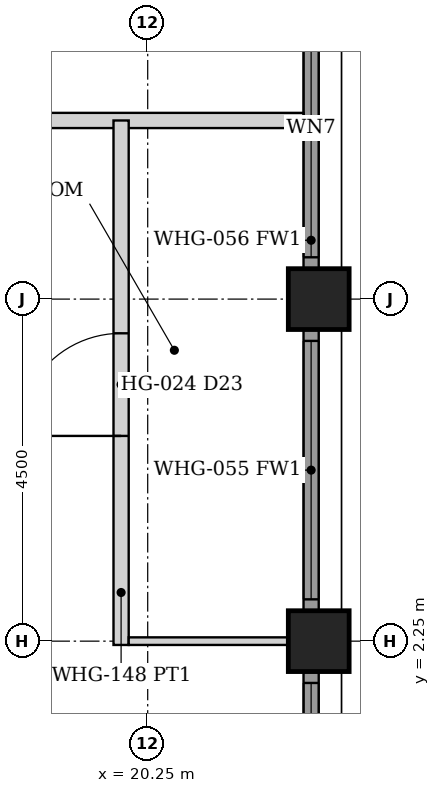
"""IFC4 building model, lengths in metres.
Left out: names, types, materials, properties, quantities, classifications, styles, units other than length and angle.
Written with IfcOpenShell. Run it as: python <this file> out.ifc"""

import sys

from ifc_helpers import new_model, si_unit, direction, frame, frame_2d, origin, origin_2d, place, context, subcontext, project, spatial, rectangle, hollow_rectangle, extrude, element, fill, save


model = new_model("IFC4")
c1 = context("Model", 3, precision=1e-05, world=origin(), true_north=direction((0.0, 1.0)))
c2 = subcontext(c1, "Body", "Model", "MODEL_VIEW")
j1 = project(units=[si_unit("LENGTHUNIT", "METRE"), si_unit("PLANEANGLEUNIT", "RADIAN")], contexts=[c1])
p1 = place(None, origin())
s1 = spatial("IfcSite", under=j1, at=p1, CompositionType="ELEMENT")
p2 = place(p1, origin())
s2 = spatial("IfcBuilding", under=s1, at=p2, CompositionType="ELEMENT")
p3 = place(p2, frame((0.0, 0.0, 186.8)))
s3 = spatial("IfcBuildingStorey", under=s2, at=p3, CompositionType="ELEMENT", Elevation=186.8)
for number, where, z_axis, x_axis in (
    (1, (22.5, 2.25, 0.0), (0.0, 0.0, 1.0), (1.0, 0.0, 0.0)),
    (2, (22.5, 6.75, 0.0), (0.0, 0.0, 1.0), (1.0, 0.0, 0.0)),
):
    element("IfcColumn", number, at=place(p3, frame(where, z_axis=z_axis, x_axis=x_axis)), inside=s3, PredefinedType="COLUMN", context=c2, shape_type="SweptSolid", body=[
        extrude(hollow_rectangle(XDim=0.8, YDim=0.8, WallThickness=0.045, at=origin_2d()), origin(), (0.0, 0.0, 1.0), 3.6),
    ])
p4 = place(p3, frame((22.4, -1.845, 0.0), z_axis=(0.0, 0.0, 1.0), x_axis=(0.0, 1.0, 0.0)))
e3 = element("IfcWall", 3, at=p4, inside=s3, PredefinedType="SOLIDWALL", context=c2, shape_type="SweptSolid", body=[
    extrude(rectangle(XDim=3.69, YDim=0.2, at=frame_2d((1.845, 0.0))), origin(), (0.0, 0.0, 1.0), 2.379),
])
p5 = place(p4, frame((0.145, 0.0, 0.3)))
e4 = element("IfcOpeningElement", 4, at=p5, cuts=e3, PredefinedType="OPENING", context=c2, shape_type="SweptSolid", body=[
    extrude(rectangle(XDim=3.4, YDim=1.929, at=frame_2d((1.7, 0.964))), frame((0.0, 0.11, 0.0), z_axis=(0.0, -1.0, 0.0), x_axis=(1.0, 0.0, 0.0)), (0.0, 0.0, 1.0), 0.22),
])
p6 = place(p3, frame((22.4, 2.655, 0.0), z_axis=(0.0, 0.0, 1.0), x_axis=(0.0, 1.0, 0.0)))
e5 = element("IfcWall", 5, at=p6, inside=s3, PredefinedType="SOLIDWALL", context=c2, shape_type="SweptSolid", body=[
    extrude(rectangle(XDim=3.69, YDim=0.2, at=frame_2d((1.845, 0.0))), origin(), (0.0, 0.0, 1.0), 2.379),
])
p7 = place(p6, frame((0.145, 0.0, 0.3)))
e6 = element("IfcOpeningElement", 6, at=p7, cuts=e5, PredefinedType="OPENING", context=c2, shape_type="SweptSolid", body=[
    extrude(rectangle(XDim=3.4, YDim=1.929, at=frame_2d((1.7, 0.964))), frame((0.0, 0.11, 0.0), z_axis=(0.0, -1.0, 0.0), x_axis=(1.0, 0.0, 0.0)), (0.0, 0.0, 1.0), 0.22),
])
p8 = place(p3, frame((22.4, 7.155, 0.0), z_axis=(0.0, 0.0, 1.0), x_axis=(0.0, 1.0, 0.0)))
e7 = element("IfcWall", 7, at=p8, inside=s3, PredefinedType="SOLIDWALL", context=c2, shape_type="SweptSolid", body=[
    extrude(rectangle(XDim=3.69, YDim=0.2, at=frame_2d((1.845, 0.0))), origin(), (0.0, 0.0, 1.0), 2.379),
])
p9 = place(p8, frame((0.145, 0.0, 0.3)))
e8 = element("IfcOpeningElement", 8, at=p9, cuts=e7, PredefinedType="OPENING", context=c2, shape_type="SweptSolid", body=[
    extrude(rectangle(XDim=3.4, YDim=1.929, at=frame_2d((1.7, 0.964))), frame((0.0, 0.11, 0.0), z_axis=(0.0, -1.0, 0.0), x_axis=(1.0, 0.0, 0.0)), (0.0, 0.0, 1.0), 0.22),
])
p10 = place(p3, frame((-22.3, 9.1, 0.0), z_axis=(0.0, 0.0, 1.0), x_axis=(1.0, 0.0, 0.0)))
e9 = element("IfcWall", 9, at=p10, inside=s3, PredefinedType="PARTITIONING", context=c2, shape_type="SweptSolid", body=[
    extrude(rectangle(XDim=44.6, YDim=0.2, at=frame_2d((22.3, 0.0))), origin(), (0.0, 0.0, 1.0), 2.379),
])
p11 = place(p10, frame((11.35, 0.0, 0.0)))
e10 = element("IfcOpeningElement", 10, at=p11, cuts=e9, PredefinedType="OPENING", context=c2, shape_type="SweptSolid", body=[
    extrude(rectangle(XDim=0.9, YDim=2.1, at=frame_2d((0.45, 1.05))), frame((0.0, 0.11, 0.0), z_axis=(0.0, -1.0, 0.0), x_axis=(1.0, 0.0, 0.0)), (0.0, 0.0, 1.0), 0.22),
])
p12 = place(p10, frame((15.75, 0.0, 0.0)))
e11 = element("IfcOpeningElement", 11, at=p12, cuts=e9, PredefinedType="OPENING", context=c2, shape_type="SweptSolid", body=[
    extrude(rectangle(XDim=0.9, YDim=2.1, at=frame_2d((0.45, 1.05))), frame((0.0, 0.11, 0.0), z_axis=(0.0, -1.0, 0.0), x_axis=(1.0, 0.0, 0.0)), (0.0, 0.0, 1.0), 0.22),
])
p13 = place(p10, frame((23.45, 0.0, 0.0)))
e12 = element("IfcOpeningElement", 12, at=p13, cuts=e9, PredefinedType="OPENING", context=c2, shape_type="SweptSolid", body=[
    extrude(rectangle(XDim=0.9, YDim=2.1, at=frame_2d((0.45, 1.05))), frame((0.0, 0.11, 0.0), z_axis=(0.0, -1.0, 0.0), x_axis=(1.0, 0.0, 0.0)), (0.0, 0.0, 1.0), 0.22),
])
p14 = place(p10, frame((24.75, 0.0, 0.0)))
e13 = element("IfcOpeningElement", 13, at=p14, cuts=e9, PredefinedType="OPENING", context=c2, shape_type="SweptSolid", body=[
    extrude(rectangle(XDim=0.9, YDim=2.1, at=frame_2d((0.45, 1.05))), frame((0.0, 0.11, 0.0), z_axis=(0.0, -1.0, 0.0), x_axis=(1.0, 0.0, 0.0)), (0.0, 0.0, 1.0), 0.22),
])
p15 = place(p10, frame((29.35, 0.0, 0.0)))
e14 = element("IfcOpeningElement", 14, at=p15, cuts=e9, PredefinedType="OPENING", context=c2, shape_type="SweptSolid", body=[
    extrude(rectangle(XDim=0.9, YDim=2.1, at=frame_2d((0.45, 1.05))), frame((0.0, 0.11, 0.0), z_axis=(0.0, -1.0, 0.0), x_axis=(1.0, 0.0, 0.0)), (0.0, 0.0, 1.0), 0.22),
])
p16 = place(p10, frame((38.85, 0.0, 0.0)))
e15 = element("IfcOpeningElement", 15, at=p16, cuts=e9, PredefinedType="OPENING", context=c2, shape_type="SweptSolid", body=[
    extrude(rectangle(XDim=0.9, YDim=2.1, at=frame_2d((0.45, 1.05))), frame((0.0, 0.11, 0.0), z_axis=(0.0, -1.0, 0.0), x_axis=(1.0, 0.0, 0.0)), (0.0, 0.0, 1.0), 0.22),
])
p17 = place(p10, frame((4.85, 0.0, 0.0)))
e16 = element("IfcOpeningElement", 16, at=p17, cuts=e9, PredefinedType="OPENING", context=c2, shape_type="SweptSolid", body=[
    extrude(rectangle(XDim=0.9, YDim=2.1, at=frame_2d((0.45, 1.05))), frame((0.0, 0.11, 0.0), z_axis=(0.0, -1.0, 0.0), x_axis=(1.0, 0.0, 0.0)), (0.0, 0.0, 1.0), 0.22),
])
p18 = place(p3, frame((19.9, 2.2, 0.0), z_axis=(0.0, 0.0, 1.0), x_axis=(0.0, 1.0, 0.0)))
e17 = element("IfcWall", 17, at=p18, inside=s3, PredefinedType="PARTITIONING", context=c2, shape_type="SweptSolid", body=[
    extrude(rectangle(XDim=6.9, YDim=0.2, at=frame_2d((3.45, 0.0))), origin(), (0.0, 0.0, 1.0), 2.379),
])
p19 = place(p18, frame((2.75, 0.0, 0.0)))
e18 = element("IfcOpeningElement", 18, at=p19, cuts=e17, PredefinedType="OPENING", context=c2, shape_type="SweptSolid", body=[
    extrude(rectangle(XDim=1.35, YDim=2.1, at=frame_2d((0.675, 1.05))), frame((0.0, 0.11, 0.0), z_axis=(0.0, -1.0, 0.0), x_axis=(1.0, 0.0, 0.0)), (0.0, 0.0, 1.0), 0.22),
])
p20 = place(p3, frame((20.0, 2.25, 0.0), z_axis=(0.0, 0.0, 1.0), x_axis=(1.0, 0.0, 0.0)))
e19 = element("IfcWall", 19, at=p20, inside=s3, PredefinedType="PARTITIONING", context=c2, shape_type="SweptSolid", body=[
    extrude(rectangle(XDim=2.1, YDim=0.1, at=frame_2d((1.05, 0.0))), origin(), (0.0, 0.0, 1.0), 2.379),
])
p21 = place(p5, origin())
e20 = element("IfcWindow", 20, at=p21, inside=s3, PartitioningType="SINGLE_PANEL", PredefinedType="WINDOW", context=c2, shape_type="SweptSolid", body=[
    extrude(rectangle(XDim=3.4, YDim=1.929, at=frame_2d((1.7, 0.964))), frame((0.0, 0.03, 0.0), z_axis=(0.0, -1.0, 0.0), x_axis=(1.0, 0.0, 0.0)), (0.0, 0.0, 1.0), 0.06),
])
fill(e4, e20)
p22 = place(p7, origin())
e21 = element("IfcWindow", 21, at=p22, inside=s3, PartitioningType="SINGLE_PANEL", PredefinedType="WINDOW", context=c2, shape_type="SweptSolid", body=[
    extrude(rectangle(XDim=3.4, YDim=1.929, at=frame_2d((1.7, 0.964))), frame((0.0, 0.03, 0.0), z_axis=(0.0, -1.0, 0.0), x_axis=(1.0, 0.0, 0.0)), (0.0, 0.0, 1.0), 0.06),
])
fill(e6, e21)
p23 = place(p9, origin())
e22 = element("IfcWindow", 22, at=p23, inside=s3, PartitioningType="SINGLE_PANEL", PredefinedType="WINDOW", context=c2, shape_type="SweptSolid", body=[
    extrude(rectangle(XDim=3.4, YDim=1.929, at=frame_2d((1.7, 0.964))), frame((0.0, 0.03, 0.0), z_axis=(0.0, -1.0, 0.0), x_axis=(1.0, 0.0, 0.0)), (0.0, 0.0, 1.0), 0.06),
])
fill(e8, e22)
p24 = place(p19, origin())
e23 = element("IfcDoor", 23, at=p24, inside=s3, OperationType="SINGLE_SWING_LEFT", PredefinedType="DOOR", context=c2, shape_type="SweptSolid", body=[
    extrude(rectangle(XDim=1.35, YDim=2.1, at=frame_2d((0.675, 1.05))), frame((0.0, 0.025, 0.0), z_axis=(0.0, -1.0, 0.0), x_axis=(1.0, 0.0, 0.0)), (0.0, 0.0, 1.0), 0.05),
])
fill(e18, e23)
save(model, sys.argv[1])
